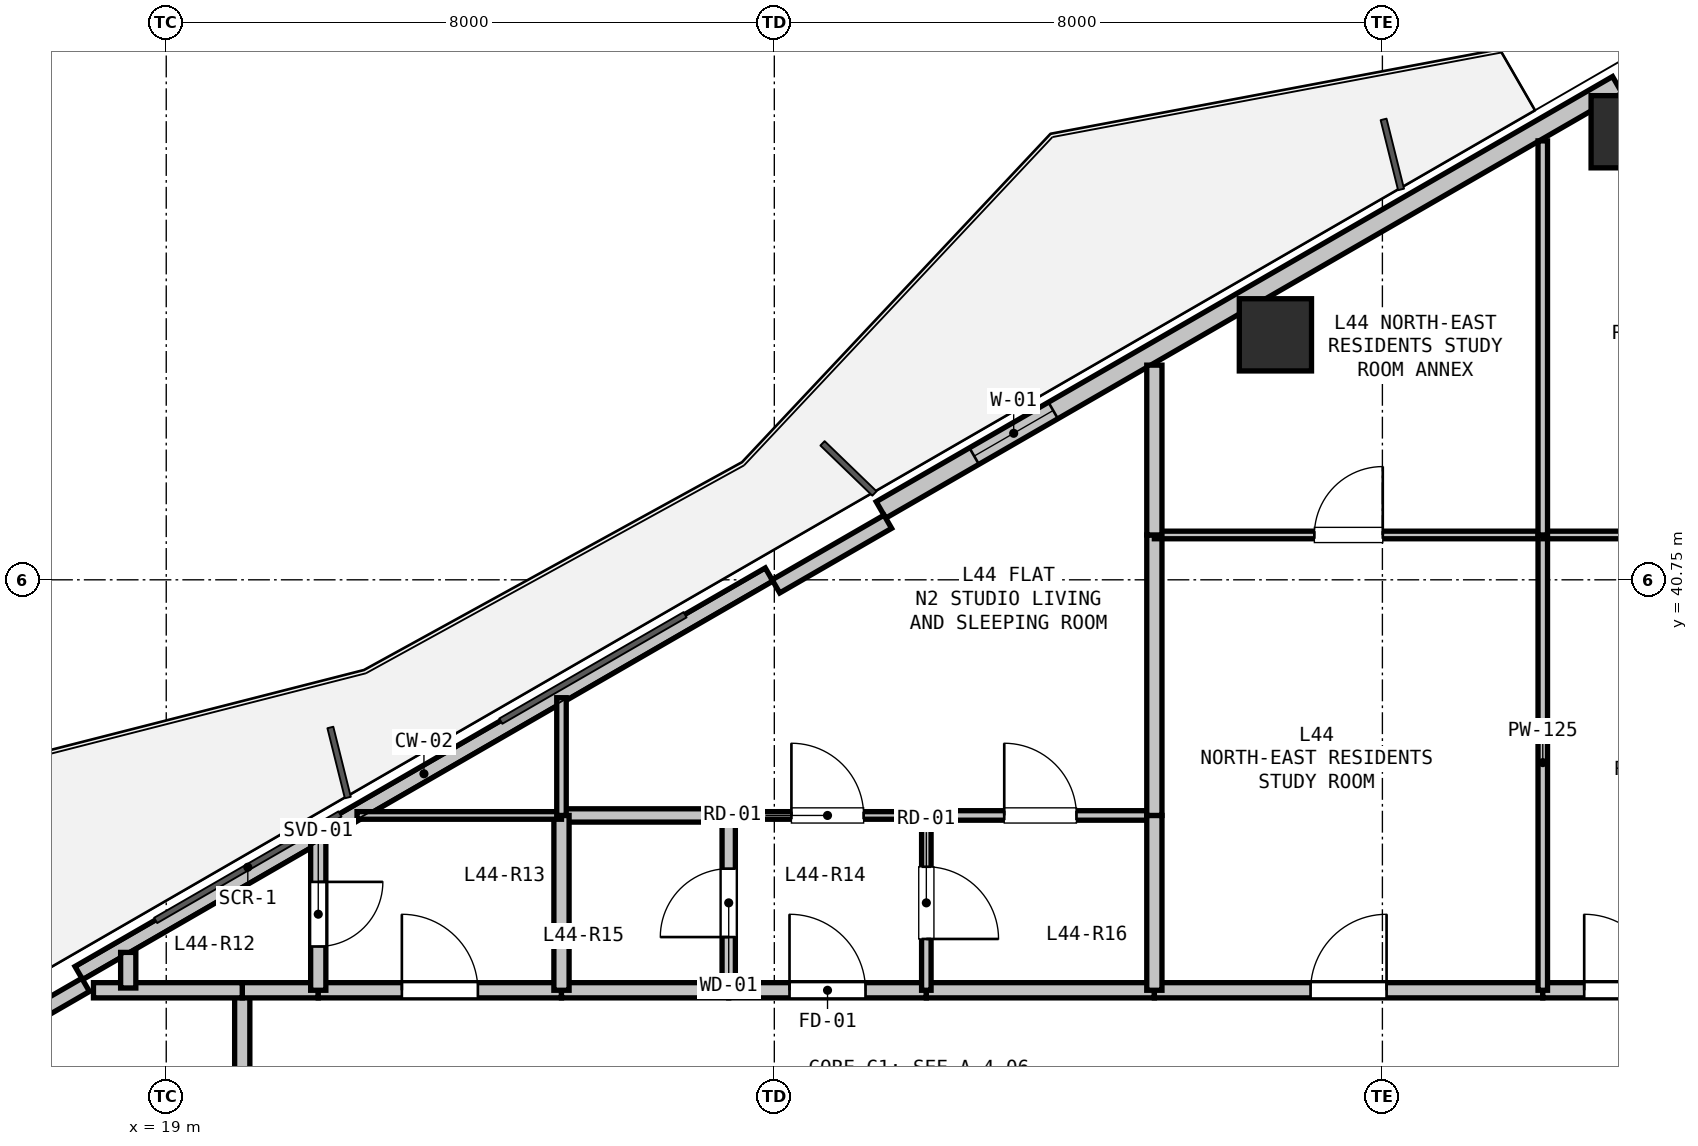
"""IFC4 building model, lengths in metres.
Left out: names, types, materials, properties, quantities, classifications, styles, units other than length and angle.
Written with IfcOpenShell. Run it as: python <this file> out.ifc"""

import sys

from ifc_helpers import new_model, si_unit, direction, frame, frame_2d, origin, origin_2d, place, context, subcontext, project, spatial, rectangle, hollow_rectangle, extrude, element, fill, save


model = new_model("IFC4")
c1 = context("Model", 3, precision=1e-05, world=origin(), true_north=direction((0.0, 1.0)))
c2 = subcontext(c1, "Body", "Model", "MODEL_VIEW")
j1 = project(units=[si_unit("LENGTHUNIT", "METRE"), si_unit("PLANEANGLEUNIT", "RADIAN")], contexts=[c1])
p1 = place(None, origin())
s1 = spatial("IfcSite", under=j1, at=p1, CompositionType="ELEMENT")
p2 = place(p1, origin())
s2 = spatial("IfcBuilding", under=s1, at=p2, CompositionType="ELEMENT")
p3 = place(p2, frame((0.0, 0.0, 157.5)))
s3 = spatial("IfcBuildingStorey", under=s2, at=p3, CompositionType="ELEMENT", Elevation=157.5)
for number, where, z_axis, x_axis in (
    (1, (33.593, 43.973, 0.0), (0.0, 0.0, 1.0), (1.0, 0.0, 0.0)),
    (2, (38.22, 46.645, 0.0), (0.0, 0.0, 1.0), (1.0, 0.0, 0.0)),
):
    element("IfcColumn", number, at=place(p3, frame(where, z_axis=z_axis, x_axis=x_axis)), inside=s3, PredefinedType="COLUMN", context=c2, shape_type="SweptSolid", body=[
        extrude(hollow_rectangle(XDim=0.95, YDim=0.95, WallThickness=0.028, at=origin_2d()), origin(), (0.0, 0.0, 1.0), 3.3),
    ])
p4 = place(p3, frame((17.85, 35.577, 0.0), z_axis=(0.0, 0.0, 1.0), x_axis=(0.866026619769, 0.499997893847, 0.0)))
e3 = element("IfcWall", 3, at=p4, inside=s3, PredefinedType="PARAPET", context=c2, shape_type="SweptSolid", body=[
    extrude(rectangle(XDim=10.486, YDim=0.2, at=frame_2d((5.243, 0.0))), origin(), (0.0, 0.0, 1.0), 0.2),
])
p5 = place(p3, frame((28.403, 41.67, 0.0), z_axis=(0.0, 0.0, 1.0), x_axis=(0.86602239209, 0.500005216371, 0.0)))
e4 = element("IfcWall", 4, at=p5, inside=s3, PredefinedType="SOLIDWALL", context=c2, shape_type="SweptSolid", body=[
    extrude(rectangle(XDim=11.186, YDim=0.25, at=frame_2d((5.593, 0.0))), origin(), (0.0, 0.0, 1.0), 2.6),
])
p6 = place(p5, frame((1.416, 0.0, 0.9)))
e5 = element("IfcOpeningElement", 5, at=p6, cuts=e4, PredefinedType="OPENING", context=c2, shape_type="SweptSolid", body=[
    extrude(rectangle(XDim=1.2, YDim=1.4, at=frame_2d((0.6, 0.7))), frame((0.0, 0.135, 0.0), z_axis=(0.0, -1.0, 0.0), x_axis=(1.0, 0.0, 0.0)), (0.0, 0.0, 1.0), 0.27),
])
for number, where, z_axis, x_axis in (
    (6, (16.468, 34.571, 0.0), (0.0, 0.0, 1.0), (0.866, 0.5, 0.0)),
    (7, (27.021, 40.664, 0.0), (0.0, 0.0, 1.0), (0.866, 0.5, 0.0)),
):
    element("IfcWall", number, at=place(p3, frame(where, z_axis=z_axis, x_axis=x_axis)), inside=s3, PredefinedType="PARAPET", context=c2, shape_type="SweptSolid", body=[
        extrude(rectangle(XDim=1.7, YDim=0.2, at=frame_2d((0.85, 0.0))), origin(), (0.0, 0.0, 1.0), 2.6),
    ])
p7 = place(p3, frame((20.0, 32.75, 0.0), z_axis=(0.0, 0.0, 1.0), x_axis=(0.0, 1.0, 0.0)))
e8 = element("IfcWall", 8, at=p7, inside=s3, PredefinedType="PARTITIONING", context=c2, shape_type="SweptSolid", body=[
    extrude(rectangle(XDim=2.6, YDim=0.2, at=frame_2d((1.3, 0.0))), origin(), (0.0, 0.0, 1.0), 2.428),
])
p8 = place(p3, frame((20.0, 35.35, 0.0), z_axis=(0.0, 0.0, 1.0), x_axis=(1.0, 0.0, 0.0)))
e9 = element("IfcWall", 9, at=p8, inside=s3, PredefinedType="PARTITIONING", context=c2, shape_type="SweptSolid", body=[
    extrude(rectangle(XDim=1.0, YDim=0.2, at=frame_2d((0.5, 0.0))), origin(), (0.0, 0.0, 1.0), 2.98),
])
p9 = place(p3, frame((21.0, 35.35, 0.0), z_axis=(0.0, 0.0, 1.0), x_axis=(1.0, 0.0, 0.0)))
e10 = element("IfcWall", 10, at=p9, inside=s3, PredefinedType="PARTITIONING", context=c2, shape_type="SweptSolid", body=[
    extrude(rectangle(XDim=3.2, YDim=0.2, at=frame_2d((1.6, 0.0))), origin(), (0.0, 0.0, 1.0), 2.98),
])
p10 = place(p9, frame((1.1, 0.0, 0.0)))
e11 = element("IfcOpeningElement", 11, at=p10, cuts=e10, PredefinedType="OPENING", context=c2, shape_type="SweptSolid", body=[
    extrude(rectangle(XDim=1.0, YDim=2.15, at=frame_2d((0.5, 1.075))), frame((0.0, 0.11, 0.0), z_axis=(0.0, -1.0, 0.0), x_axis=(1.0, 0.0, 0.0)), (0.0, 0.0, 1.0), 0.22),
])
p11 = place(p3, frame((24.2, 35.35, 0.0), z_axis=(0.0, 0.0, 1.0), x_axis=(1.0, 0.0, 0.0)))
e12 = element("IfcWall", 12, at=p11, inside=s3, PredefinedType="PARTITIONING", context=c2, shape_type="SweptSolid", body=[
    extrude(rectangle(XDim=2.2, YDim=0.2, at=frame_2d((1.1, 0.0))), origin(), (0.0, 0.0, 1.0), 2.98),
])
p12 = place(p3, frame((26.4, 35.35, 0.0), z_axis=(0.0, 0.0, 1.0), x_axis=(1.0, 0.0, 0.0)))
e13 = element("IfcWall", 13, at=p12, inside=s3, PredefinedType="PARTITIONING", context=c2, shape_type="SweptSolid", body=[
    extrude(rectangle(XDim=2.6, YDim=0.2, at=frame_2d((1.3, 0.0))), origin(), (0.0, 0.0, 1.0), 2.98),
])
p13 = place(p12, frame((0.8, 0.0, 0.0)))
e14 = element("IfcOpeningElement", 14, at=p13, cuts=e13, PredefinedType="OPENING", context=c2, shape_type="SweptSolid", body=[
    extrude(rectangle(XDim=1.0, YDim=2.15, at=frame_2d((0.5, 1.075))), frame((0.0, 0.11, 0.0), z_axis=(0.0, -1.0, 0.0), x_axis=(1.0, 0.0, 0.0)), (0.0, 0.0, 1.0), 0.22),
])
p14 = place(p3, frame((29.0, 35.35, 0.0), z_axis=(0.0, 0.0, 1.0), x_axis=(1.0, 0.0, 0.0)))
e15 = element("IfcWall", 15, at=p14, inside=s3, PredefinedType="PARTITIONING", context=c2, shape_type="SweptSolid", body=[
    extrude(rectangle(XDim=3.0, YDim=0.2, at=frame_2d((1.5, 0.0))), origin(), (0.0, 0.0, 1.0), 2.98),
])
p15 = place(p3, frame((32.0, 35.35, 0.0), z_axis=(0.0, 0.0, 1.0), x_axis=(1.0, 0.0, 0.0)))
e16 = element("IfcWall", 16, at=p15, inside=s3, PredefinedType="PARTITIONING", context=c2, shape_type="SweptSolid", body=[
    extrude(rectangle(XDim=5.11, YDim=0.2, at=frame_2d((2.555, 0.0))), origin(), (0.0, 0.0, 1.0), 2.428),
])
p16 = place(p15, frame((2.055, 0.0, 0.0)))
e17 = element("IfcOpeningElement", 17, at=p16, cuts=e16, PredefinedType="OPENING", context=c2, shape_type="SweptSolid", body=[
    extrude(rectangle(XDim=1.0, YDim=2.15, at=frame_2d((0.5, 1.075))), frame((0.0, 0.11, 0.0), z_axis=(0.0, -1.0, 0.0), x_axis=(1.0, 0.0, 0.0)), (0.0, 0.0, 1.0), 0.22),
])
p17 = place(p3, frame((37.11, 35.35, 0.0), z_axis=(0.0, 0.0, 1.0), x_axis=(1.0, 0.0, 0.0)))
e18 = element("IfcWall", 18, at=p17, inside=s3, PredefinedType="PARTITIONING", context=c2, shape_type="SweptSolid", body=[
    extrude(rectangle(XDim=2.09, YDim=0.2, at=frame_2d((1.045, 0.0))), origin(), (0.0, 0.0, 1.0), 2.428),
])
p18 = place(p17, frame((0.545, 0.0, 0.0)))
e19 = element("IfcOpeningElement", 19, at=p18, cuts=e18, PredefinedType="OPENING", context=c2, shape_type="SweptSolid", body=[
    extrude(rectangle(XDim=1.0, YDim=2.15, at=frame_2d((0.5, 1.075))), frame((0.0, 0.11, 0.0), z_axis=(0.0, -1.0, 0.0), x_axis=(1.0, 0.0, 0.0)), (0.0, 0.0, 1.0), 0.22),
])
p19 = place(p3, frame((26.4, 37.65, 0.0), z_axis=(0.0, 0.0, 1.0), x_axis=(1.0, 0.0, 0.0)))
e20 = element("IfcWall", 20, at=p19, inside=s3, PredefinedType="PARTITIONING", context=c2, shape_type="SweptSolid", body=[
    extrude(rectangle(XDim=2.6, YDim=0.1, at=frame_2d((1.3, 0.0))), origin(), (0.0, 0.0, 1.0), 2.98),
])
p20 = place(p19, frame((0.825, 0.0, 0.0)))
e21 = element("IfcOpeningElement", 21, at=p20, cuts=e20, PredefinedType="OPENING", context=c2, shape_type="SweptSolid", body=[
    extrude(rectangle(XDim=0.95, YDim=2.1, at=frame_2d((0.475, 1.05))), frame((0.0, 0.06, 0.0), z_axis=(0.0, -1.0, 0.0), x_axis=(1.0, 0.0, 0.0)), (0.0, 0.0, 1.0), 0.12),
])
p21 = place(p3, frame((29.0, 37.65, 0.0), z_axis=(0.0, 0.0, 1.0), x_axis=(0.0, -1.0, 0.0)))
e22 = element("IfcWall", 22, at=p21, inside=s3, PredefinedType="PARTITIONING", context=c2, shape_type="SweptSolid", body=[
    extrude(rectangle(XDim=2.3, YDim=0.125, at=frame_2d((1.15, 0.0))), origin(), (0.0, 0.0, 1.0), 2.98),
])
p22 = place(p21, frame((0.675, 0.0, 0.0)))
e23 = element("IfcOpeningElement", 23, at=p22, cuts=e22, PredefinedType="OPENING", context=c2, shape_type="SweptSolid", body=[
    extrude(rectangle(XDim=0.95, YDim=2.1, at=frame_2d((0.475, 1.05))), frame((0.0, 0.073, 0.0), z_axis=(0.0, -1.0, 0.0), x_axis=(1.0, 0.0, 0.0)), (0.0, 0.0, 1.0), 0.145),
])
p23 = place(p3, frame((26.4, 35.35, 0.0), z_axis=(0.0, 0.0, 1.0), x_axis=(0.0, 1.0, 0.0)))
e24 = element("IfcWall", 24, at=p23, inside=s3, PredefinedType="PLUMBINGWALL", context=c2, shape_type="SweptSolid", body=[
    extrude(rectangle(XDim=2.3, YDim=0.175, at=frame_2d((1.15, 0.0))), origin(), (0.0, 0.0, 1.0), 2.98),
])
p24 = place(p23, frame((0.7, 0.0, 0.0)))
e25 = element("IfcOpeningElement", 25, at=p24, cuts=e24, PredefinedType="OPENING", context=c2, shape_type="SweptSolid", body=[
    extrude(rectangle(XDim=0.9, YDim=2.1, at=frame_2d((0.45, 1.05))), frame((0.0, 0.097, 0.0), z_axis=(0.0, -1.0, 0.0), x_axis=(1.0, 0.0, 0.0)), (0.0, 0.0, 1.0), 0.195),
])
p25 = place(p3, frame((24.2, 37.65, 0.0), z_axis=(0.0, 0.0, 1.0), x_axis=(1.0, 0.0, 0.0)))
e26 = element("IfcWall", 26, at=p25, inside=s3, PredefinedType="PLUMBINGWALL", context=c2, shape_type="SweptSolid", body=[
    extrude(rectangle(XDim=2.2, YDim=0.175, at=frame_2d((1.1, 0.0))), origin(), (0.0, 0.0, 1.0), 2.98),
])
p26 = place(p3, frame((24.2, 35.35, 0.0), z_axis=(0.0, 0.0, 1.0), x_axis=(0.0, 1.0, 0.0)))
e27 = element("IfcWall", 27, at=p26, inside=s3, PredefinedType="PARTITIONING", context=c2, shape_type="SweptSolid", body=[
    extrude(rectangle(XDim=2.3, YDim=0.2, at=frame_2d((1.15, 0.0))), origin(), (0.0, 0.0, 1.0), 2.98),
])
p27 = place(p3, frame((29.0, 37.65, 0.0), z_axis=(0.0, 0.0, 1.0), x_axis=(1.0, 0.0, 0.0)))
e28 = element("IfcWall", 28, at=p27, inside=s3, PredefinedType="PARTITIONING", context=c2, shape_type="SweptSolid", body=[
    extrude(rectangle(XDim=3.0, YDim=0.125, at=frame_2d((1.5, 0.0))), origin(), (0.0, 0.0, 1.0), 2.98),
])
p28 = place(p27, frame((1.025, 0.0, 0.0)))
e29 = element("IfcOpeningElement", 29, at=p28, cuts=e28, PredefinedType="OPENING", context=c2, shape_type="SweptSolid", body=[
    extrude(rectangle(XDim=0.95, YDim=2.1, at=frame_2d((0.475, 1.05))), frame((0.0, 0.073, 0.0), z_axis=(0.0, -1.0, 0.0), x_axis=(1.0, 0.0, 0.0)), (0.0, 0.0, 1.0), 0.145),
])
p29 = place(p3, frame((32.0, 37.65, 0.0), z_axis=(0.0, 0.0, 1.0), x_axis=(0.0, -1.0, 0.0)))
e30 = element("IfcWall", 30, at=p29, inside=s3, PredefinedType="PARTITIONING", context=c2, shape_type="SweptSolid", body=[
    extrude(rectangle(XDim=2.3, YDim=0.2, at=frame_2d((1.15, 0.0))), origin(), (0.0, 0.0, 1.0), 2.98),
])
p30 = place(p3, frame((32.0, 37.65, 0.0), z_axis=(0.0, 0.0, 1.0), x_axis=(0.0, 1.0, 0.0)))
e31 = element("IfcWall", 31, at=p30, inside=s3, PredefinedType="PARTITIONING", context=c2, shape_type="SweptSolid", body=[
    extrude(rectangle(XDim=3.69, YDim=0.2, at=frame_2d((1.845, 0.0))), origin(), (0.0, 0.0, 1.0), 2.98),
])
p31 = place(p3, frame((32.0, 41.34, 0.0), z_axis=(0.0, 0.0, 1.0), x_axis=(1.0, 0.0, 0.0)))
e32 = element("IfcWall", 32, at=p31, inside=s3, PredefinedType="PARTITIONING", context=c2, shape_type="SweptSolid", body=[
    extrude(rectangle(XDim=5.11, YDim=0.1, at=frame_2d((2.555, 0.0))), origin(), (0.0, 0.0, 1.0), 2.98),
])
p32 = place(p31, frame((2.105, 0.0, 0.0)))
e33 = element("IfcOpeningElement", 33, at=p32, cuts=e32, PredefinedType="OPENING", context=c2, shape_type="SweptSolid", body=[
    extrude(rectangle(XDim=0.9, YDim=2.1, at=frame_2d((0.45, 1.05))), frame((0.0, 0.06, 0.0), z_axis=(0.0, -1.0, 0.0), x_axis=(1.0, 0.0, 0.0)), (0.0, 0.0, 1.0), 0.12),
])
p33 = place(p3, frame((37.11, 41.34, 0.0), z_axis=(0.0, 0.0, 1.0), x_axis=(0.0, -1.0, 0.0)))
e34 = element("IfcWall", 34, at=p33, inside=s3, PredefinedType="PARTITIONING", context=c2, shape_type="SweptSolid", body=[
    extrude(rectangle(XDim=5.99, YDim=0.125, at=frame_2d((2.995, 0.0))), origin(), (0.0, 0.0, 1.0), 2.428),
])
p34 = place(p3, frame((37.11, 41.34, 0.0), z_axis=(0.0, 0.0, 1.0), x_axis=(1.0, 0.0, 0.0)))
e35 = element("IfcWall", 35, at=p34, inside=s3, PredefinedType="PARTITIONING", context=c2, shape_type="SweptSolid", body=[
    extrude(rectangle(XDim=4.96, YDim=0.1, at=frame_2d((2.48, 0.0))), origin(), (0.0, 0.0, 1.0), 2.428),
])
p35 = place(p34, frame((2.03, 0.0, 0.0)))
e36 = element("IfcOpeningElement", 36, at=p35, cuts=e35, PredefinedType="OPENING", context=c2, shape_type="SweptSolid", body=[
    extrude(rectangle(XDim=0.9, YDim=2.1, at=frame_2d((0.45, 1.05))), frame((0.0, 0.06, 0.0), z_axis=(0.0, -1.0, 0.0), x_axis=(1.0, 0.0, 0.0)), (0.0, 0.0, 1.0), 0.12),
])
p36 = place(p3, frame((32.0, 41.34, 0.0), z_axis=(0.0, 0.0, 1.0), x_axis=(0.0, 1.0, 0.0)))
e37 = element("IfcWall", 37, at=p36, inside=s3, PredefinedType="PARTITIONING", context=c2, shape_type="SweptSolid", body=[
    extrude(rectangle(XDim=2.234, YDim=0.2, at=frame_2d((1.117, 0.0))), origin(), (0.0, 0.0, 1.0), 2.365),
])
p37 = place(p3, frame((37.11, 46.524, 0.0), z_axis=(0.0, 0.0, 1.0), x_axis=(0.0, -1.0, 0.0)))
e38 = element("IfcWall", 38, at=p37, inside=s3, PredefinedType="PARTITIONING", context=c2, shape_type="SweptSolid", body=[
    extrude(rectangle(XDim=5.184, YDim=0.125, at=frame_2d((2.592, 0.0))), origin(), (0.0, 0.0, 1.0), 2.645),
])
p38 = place(p3, frame((20.0, 35.35, 0.0), z_axis=(0.0, 0.0, 1.0), x_axis=(-1.0, 0.0, 0.0)))
e39 = element("IfcWall", 39, at=p38, inside=s3, PredefinedType="PARTITIONING", context=c2, shape_type="SweptSolid", body=[
    extrude(rectangle(XDim=1.958, YDim=0.2, at=frame_2d((0.979, 0.0))), origin(), (0.0, 0.0, 1.0), 2.365),
])
p39 = place(p3, frame((18.5, 35.38, 0.0), z_axis=(0.0, 0.0, 1.0), x_axis=(0.0, 1.0, 0.0)))
e40 = element("IfcWall", 40, at=p39, inside=s3, PredefinedType="PARTITIONING", context=c2, shape_type="SweptSolid", body=[
    extrude(rectangle(XDim=0.468, YDim=0.2, at=frame_2d((0.234, 0.0))), origin(), (0.0, 0.0, 1.0), 2.365),
])
p40 = place(p3, frame((21.0, 37.352, 0.0), z_axis=(0.0, 0.0, 1.0), x_axis=(0.0, -1.0, 0.0)))
e41 = element("IfcWall", 41, at=p40, inside=s3, PredefinedType="PARTITIONING", context=c2, shape_type="SweptSolid", body=[
    extrude(rectangle(XDim=2.001, YDim=0.2, at=frame_2d((1.001, 0.0))), origin(), (0.0, 0.0, 1.0), 2.365),
])
p41 = place(p40, frame((0.576, 0.0, 0.0)))
e42 = element("IfcOpeningElement", 42, at=p41, cuts=e41, PredefinedType="OPENING", context=c2, shape_type="SweptSolid", body=[
    extrude(rectangle(XDim=0.85, YDim=2.1, at=frame_2d((0.425, 1.05))), frame((0.0, 0.11, 0.0), z_axis=(0.0, -1.0, 0.0), x_axis=(1.0, 0.0, 0.0)), (0.0, 0.0, 1.0), 0.22),
])
p42 = place(p3, frame((21.51, 37.65, 0.0), z_axis=(0.0, 0.0, 1.0), x_axis=(1.0, 0.0, 0.0)))
e43 = element("IfcWall", 43, at=p42, inside=s3, PredefinedType="PARTITIONING", context=c2, shape_type="SweptSolid", body=[
    extrude(rectangle(XDim=2.69, YDim=0.1, at=frame_2d((1.345, 0.0))), origin(), (0.0, 0.0, 1.0), 2.365),
])
p43 = place(p3, frame((24.2, 37.65, 0.0), z_axis=(0.0, 0.0, 1.0), x_axis=(0.0, 1.0, 0.0)))
e44 = element("IfcWall", 44, at=p43, inside=s3, PredefinedType="PARTITIONING", context=c2, shape_type="SweptSolid", body=[
    extrude(rectangle(XDim=1.549, YDim=0.125, at=frame_2d((0.774, 0.0))), origin(), (0.0, 0.0, 1.0), 2.365),
])
p44 = place(p6, origin())
e45 = element("IfcWindow", 45, at=p44, inside=s3, PartitioningType="SINGLE_PANEL", PredefinedType="WINDOW", context=c2, shape_type="SweptSolid", body=[
    extrude(rectangle(XDim=1.2, YDim=1.4, at=frame_2d((0.6, 0.7))), frame((0.0, 0.03, 0.0), z_axis=(0.0, -1.0, 0.0), x_axis=(1.0, 0.0, 0.0)), (0.0, 0.0, 1.0), 0.06),
])
fill(e5, e45)
p45 = place(p13, origin())
e46 = element("IfcDoor", 46, at=p45, inside=s3, OperationType="SINGLE_SWING_LEFT", PredefinedType="DOOR", context=c2, shape_type="SweptSolid", body=[
    extrude(rectangle(XDim=1.0, YDim=2.15, at=frame_2d((0.5, 1.075))), frame((0.0, 0.025, 0.0), z_axis=(0.0, -1.0, 0.0), x_axis=(1.0, 0.0, 0.0)), (0.0, 0.0, 1.0), 0.05),
])
fill(e14, e46)
p46 = place(p16, origin())
e47 = element("IfcDoor", 47, at=p46, inside=s3, OperationType="SINGLE_SWING_RIGHT", PredefinedType="DOOR", context=c2, shape_type="SweptSolid", body=[
    extrude(rectangle(XDim=1.0, YDim=2.15, at=frame_2d((0.5, 1.075))), frame((0.0, 0.025, 0.0), z_axis=(0.0, -1.0, 0.0), x_axis=(1.0, 0.0, 0.0)), (0.0, 0.0, 1.0), 0.05),
])
fill(e17, e47)
p47 = place(p18, origin())
e48 = element("IfcDoor", 48, at=p47, inside=s3, OperationType="SINGLE_SWING_LEFT", PredefinedType="DOOR", context=c2, shape_type="SweptSolid", body=[
    extrude(rectangle(XDim=1.0, YDim=2.15, at=frame_2d((0.5, 1.075))), frame((0.0, 0.025, 0.0), z_axis=(0.0, -1.0, 0.0), x_axis=(1.0, 0.0, 0.0)), (0.0, 0.0, 1.0), 0.05),
])
fill(e19, e48)
p48 = place(p10, origin())
e49 = element("IfcDoor", 49, at=p48, inside=s3, OperationType="SINGLE_SWING_LEFT", PredefinedType="DOOR", context=c2, shape_type="SweptSolid", body=[
    extrude(rectangle(XDim=1.0, YDim=2.15, at=frame_2d((0.5, 1.075))), frame((0.0, 0.025, 0.0), z_axis=(0.0, -1.0, 0.0), x_axis=(1.0, 0.0, 0.0)), (0.0, 0.0, 1.0), 0.05),
])
fill(e11, e49)
p49 = place(p24, origin())
e50 = element("IfcDoor", 50, at=p49, inside=s3, OperationType="SINGLE_SWING_LEFT", PredefinedType="DOOR", context=c2, shape_type="SweptSolid", body=[
    extrude(rectangle(XDim=0.9, YDim=2.1, at=frame_2d((0.45, 1.05))), frame((0.0, 0.025, 0.0), z_axis=(0.0, -1.0, 0.0), x_axis=(1.0, 0.0, 0.0)), (0.0, 0.0, 1.0), 0.05),
])
fill(e25, e50)
p50 = place(p22, origin())
e51 = element("IfcDoor", 51, at=p50, inside=s3, OperationType="SINGLE_SWING_RIGHT", PredefinedType="DOOR", context=c2, shape_type="SweptSolid", body=[
    extrude(rectangle(XDim=0.95, YDim=2.1, at=frame_2d((0.475, 1.05))), frame((0.0, 0.025, 0.0), z_axis=(0.0, -1.0, 0.0), x_axis=(1.0, 0.0, 0.0)), (0.0, 0.0, 1.0), 0.05),
])
fill(e23, e51)
p51 = place(p20, origin())
e52 = element("IfcDoor", 52, at=p51, inside=s3, OperationType="SINGLE_SWING_LEFT", PredefinedType="DOOR", context=c2, shape_type="SweptSolid", body=[
    extrude(rectangle(XDim=0.95, YDim=2.1, at=frame_2d((0.475, 1.05))), frame((0.0, 0.025, 0.0), z_axis=(0.0, -1.0, 0.0), x_axis=(1.0, 0.0, 0.0)), (0.0, 0.0, 1.0), 0.05),
])
fill(e21, e52)
p52 = place(p28, origin())
e53 = element("IfcDoor", 53, at=p52, inside=s3, OperationType="SINGLE_SWING_LEFT", PredefinedType="DOOR", context=c2, shape_type="SweptSolid", body=[
    extrude(rectangle(XDim=0.95, YDim=2.1, at=frame_2d((0.475, 1.05))), frame((0.0, 0.025, 0.0), z_axis=(0.0, -1.0, 0.0), x_axis=(1.0, 0.0, 0.0)), (0.0, 0.0, 1.0), 0.05),
])
fill(e29, e53)
p53 = place(p32, origin())
e54 = element("IfcDoor", 54, at=p53, inside=s3, OperationType="SINGLE_SWING_RIGHT", PredefinedType="DOOR", context=c2, shape_type="SweptSolid", body=[
    extrude(rectangle(XDim=0.9, YDim=2.1, at=frame_2d((0.45, 1.05))), frame((0.0, 0.025, 0.0), z_axis=(0.0, -1.0, 0.0), x_axis=(1.0, 0.0, 0.0)), (0.0, 0.0, 1.0), 0.05),
])
fill(e33, e54)
p54 = place(p41, origin())
e55 = element("IfcDoor", 55, at=p54, inside=s3, OperationType="SINGLE_SWING_LEFT", PredefinedType="DOOR", context=c2, shape_type="SweptSolid", body=[
    extrude(rectangle(XDim=0.85, YDim=2.1, at=frame_2d((0.425, 1.05))), frame((0.0, 0.025, 0.0), z_axis=(0.0, -1.0, 0.0), x_axis=(1.0, 0.0, 0.0)), (0.0, 0.0, 1.0), 0.05),
])
fill(e42, e55)
save(model, sys.argv[1])
